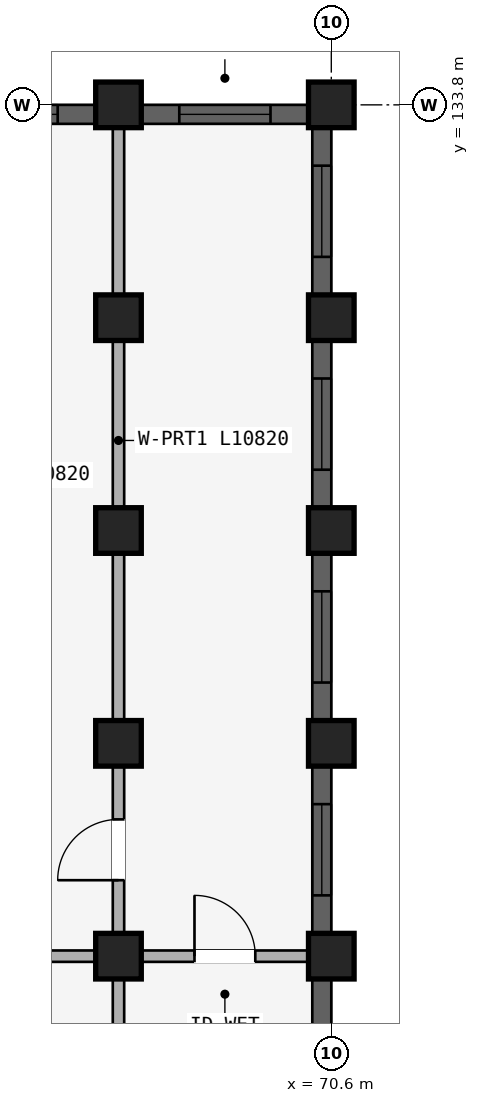
"""IFC4 building model, lengths in metres.
Left out: names, types, materials, properties, quantities, classifications, styles, units other than length and angle.
Written with IfcOpenShell. Run it as: python <this file> out.ifc"""

import sys

from ifc_helpers import new_model, si_unit, direction, frame, frame_2d, origin, origin_2d, place, context, subcontext, project, spatial, rectangle, extrude, element, fill, save


model = new_model("IFC4")
c1 = context("Model", 3, precision=1e-05, world=origin(), true_north=direction((0.0, 1.0)))
c2 = subcontext(c1, "Body", "Model", "MODEL_VIEW")
j1 = project(units=[si_unit("LENGTHUNIT", "METRE"), si_unit("PLANEANGLEUNIT", "RADIAN")], contexts=[c1])
p1 = place(None, origin())
s1 = spatial("IfcSite", under=j1, at=p1, CompositionType="ELEMENT")
p2 = place(p1, origin())
s2 = spatial("IfcBuilding", under=s1, at=p2, CompositionType="ELEMENT")
p3 = place(p2, frame((0.0, 0.0, 37.05)))
s3 = spatial("IfcBuildingStorey", under=s2, at=p3, CompositionType="ELEMENT", Elevation=37.05)
for number, where, z_axis, x_axis in (
    (1, (67.8, 122.6, 0.0), (0.0, 0.0, 1.0), (1.0, 0.0, 0.0)),
    (2, (67.8, 125.4, 0.0), (0.0, 0.0, 1.0), (1.0, 0.0, 0.0)),
    (3, (67.8, 128.2, 0.0), (0.0, 0.0, 1.0), (1.0, 0.0, 0.0)),
    (4, (67.8, 131.0, 0.0), (0.0, 0.0, 1.0), (1.0, 0.0, 0.0)),
):
    element("IfcColumn", number, at=place(p3, frame(where, z_axis=z_axis, x_axis=x_axis)), inside=s3, PredefinedType="COLUMN", context=c2, shape_type="SweptSolid", body=[
        extrude(rectangle(XDim=0.6, YDim=0.6, at=origin_2d()), origin(), (0.0, 0.0, 1.0), 2.93),
    ])
p4 = place(p3, frame((67.8, 133.8, 0.0), z_axis=(0.0, 0.0, 1.0), x_axis=(1.0, 0.0, 0.0)))
e5 = element("IfcColumn", 5, at=p4, inside=s3, PredefinedType="COLUMN", context=c2, shape_type="SweptSolid", body=[
    extrude(rectangle(XDim=0.6, YDim=0.6, at=origin_2d()), origin(), (0.0, 0.0, 1.0), 2.97),
])
for number, where, z_axis, x_axis in (
    (6, (70.6, 122.6, 0.0), (0.0, 0.0, 1.0), (1.0, 0.0, 0.0)),
    (7, (70.6, 125.4, 0.0), (0.0, 0.0, 1.0), (1.0, 0.0, 0.0)),
    (8, (70.6, 128.2, 0.0), (0.0, 0.0, 1.0), (1.0, 0.0, 0.0)),
    (9, (70.6, 131.0, 0.0), (0.0, 0.0, 1.0), (1.0, 0.0, 0.0)),
):
    element("IfcColumn", number, at=place(p3, frame(where, z_axis=z_axis, x_axis=x_axis)), inside=s3, PredefinedType="COLUMN", context=c2, shape_type="SweptSolid", body=[
        extrude(rectangle(XDim=0.6, YDim=0.6, at=origin_2d()), origin(), (0.0, 0.0, 1.0), 2.93),
    ])
p5 = place(p3, frame((70.6, 133.8, 0.0), z_axis=(0.0, 0.0, 1.0), x_axis=(1.0, 0.0, 0.0)))
e10 = element("IfcColumn", 10, at=p5, inside=s3, PredefinedType="COLUMN", context=c2, shape_type="SweptSolid", body=[
    extrude(rectangle(XDim=0.6, YDim=0.6, at=origin_2d()), origin(), (0.0, 0.0, 1.0), 2.97),
])
p6 = place(p3, frame((65.08, 122.6, 0.0), z_axis=(0.0, 0.0, 1.0), x_axis=(1.0, 0.0, 0.0)))
e11 = element("IfcWall", 11, at=p6, inside=s3, PredefinedType="PLUMBINGWALL", context=c2, shape_type="SweptSolid", body=[
    extrude(rectangle(XDim=2.64, YDim=0.15, at=frame_2d((1.32, 0.0))), origin(), (0.0, 0.0, 1.0), 2.372),
])
p7 = place(p6, frame((0.87, 0.0, 0.0)))
e12 = element("IfcOpeningElement", 12, at=p7, cuts=e11, PredefinedType="OPENING", context=c2, shape_type="SweptSolid", body=[
    extrude(rectangle(XDim=0.9, YDim=2.1, at=frame_2d((0.45, 1.05))), frame((0.0, 0.085, 0.0), z_axis=(0.0, -1.0, 0.0), x_axis=(1.0, 0.0, 0.0)), (0.0, 0.0, 1.0), 0.17),
])
p8 = place(p3, frame((67.88, 122.6, 0.0), z_axis=(0.0, 0.0, 1.0), x_axis=(1.0, 0.0, 0.0)))
e13 = element("IfcWall", 13, at=p8, inside=s3, PredefinedType="PLUMBINGWALL", context=c2, shape_type="SweptSolid", body=[
    extrude(rectangle(XDim=2.64, YDim=0.15, at=frame_2d((1.32, 0.0))), origin(), (0.0, 0.0, 1.0), 2.372),
])
p9 = place(p8, frame((0.92, 0.0, 0.0)))
e14 = element("IfcOpeningElement", 14, at=p9, cuts=e13, PredefinedType="OPENING", context=c2, shape_type="SweptSolid", body=[
    extrude(rectangle(XDim=0.8, YDim=2.1, at=frame_2d((0.4, 1.05))), frame((0.0, 0.085, 0.0), z_axis=(0.0, -1.0, 0.0), x_axis=(1.0, 0.0, 0.0)), (0.0, 0.0, 1.0), 0.17),
])
p10 = place(p3, frame((67.8, 116.05, 0.0), z_axis=(0.0, 0.0, 1.0), x_axis=(0.0, 1.0, 0.0)))
e15 = element("IfcWall", 15, at=p10, inside=s3, PredefinedType="PARTITIONING", context=c2, shape_type="SweptSolid", body=[
    extrude(rectangle(XDim=6.53, YDim=0.15, at=frame_2d((3.265, 0.0))), origin(), (0.0, 0.0, 1.0), 2.372),
])
p11 = place(p10, frame((2.815, 0.0, 0.0)))
e16 = element("IfcOpeningElement", 16, at=p11, cuts=e15, PredefinedType="OPENING", context=c2, shape_type="SweptSolid", body=[
    extrude(rectangle(XDim=0.9, YDim=2.1, at=frame_2d((0.45, 1.05))), frame((0.0, 0.085, 0.0), z_axis=(0.0, -1.0, 0.0), x_axis=(1.0, 0.0, 0.0)), (0.0, 0.0, 1.0), 0.17),
])
p12 = place(p3, frame((67.8, 122.7, 0.0), z_axis=(0.0, 0.0, 1.0), x_axis=(0.0, 1.0, 0.0)))
e17 = element("IfcWall", 17, at=p12, inside=s3, PredefinedType="PARTITIONING", context=c2, shape_type="SweptSolid", body=[
    extrude(rectangle(XDim=10.82, YDim=0.15, at=frame_2d((5.41, 0.0))), origin(), (0.0, 0.0, 1.0), 2.372),
])
p13 = place(p12, frame((0.899, 0.0, 0.0)))
e18 = element("IfcOpeningElement", 18, at=p13, cuts=e17, PredefinedType="OPENING", context=c2, shape_type="SweptSolid", body=[
    extrude(rectangle(XDim=0.8, YDim=2.1, at=frame_2d((0.4, 1.05))), frame((0.0, 0.085, 0.0), z_axis=(0.0, -1.0, 0.0), x_axis=(1.0, 0.0, 0.0)), (0.0, 0.0, 1.0), 0.17),
])
p14 = place(p3, frame((65.303, 133.675, 0.0), z_axis=(0.0, 0.0, 1.0), x_axis=(1.0, 0.0, 0.0)))
e19 = element("IfcWall", 19, at=p14, inside=s3, PredefinedType="STANDARD", context=c2, shape_type="SweptSolid", body=[
    extrude(rectangle(XDim=2.193, YDim=0.25, at=frame_2d((1.097, 0.0))), origin(), (0.0, 0.0, 1.0), 2.48),
])
p15 = place(p14, frame((0.497, 0.0, 0.78)))
e20 = element("IfcOpeningElement", 20, at=p15, cuts=e19, PredefinedType="OPENING", context=c2, shape_type="SweptSolid", body=[
    extrude(rectangle(XDim=1.2, YDim=1.5, at=frame_2d((0.6, 0.75))), frame((0.0, 0.135, 0.0), z_axis=(0.0, -1.0, 0.0), x_axis=(1.0, 0.0, 0.0)), (0.0, 0.0, 1.0), 0.27),
])
p16 = place(p3, frame((68.104, 133.675, 0.0), z_axis=(0.0, 0.0, 1.0), x_axis=(1.0, 0.0, 0.0)))
e21 = element("IfcWall", 21, at=p16, inside=s3, PredefinedType="STANDARD", context=c2, shape_type="SweptSolid", body=[
    extrude(rectangle(XDim=2.193, YDim=0.25, at=frame_2d((1.096, 0.0))), origin(), (0.0, 0.0, 1.0), 2.48),
])
p17 = place(p16, frame((0.497, 0.0, 0.78)))
e22 = element("IfcOpeningElement", 22, at=p17, cuts=e21, PredefinedType="OPENING", context=c2, shape_type="SweptSolid", body=[
    extrude(rectangle(XDim=1.2, YDim=1.5, at=frame_2d((0.6, 0.75))), frame((0.0, 0.135, 0.0), z_axis=(0.0, -1.0, 0.0), x_axis=(1.0, 0.0, 0.0)), (0.0, 0.0, 1.0), 0.27),
])
p18 = place(p3, frame((70.475, 116.329, 0.0), z_axis=(0.0, 0.0, 1.0), x_axis=(0.0, 1.0, 0.0)))
e23 = element("IfcWall", 23, at=p18, inside=s3, PredefinedType="STANDARD", context=c2, shape_type="SweptSolid", body=[
    extrude(rectangle(XDim=5.968, YDim=0.25, at=frame_2d((2.984, 0.0))), origin(), (0.0, 0.0, 1.0), 2.372),
])
p19 = place(p18, frame((2.221, 0.0, 0.522)))
e24 = element("IfcOpeningElement", 24, at=p19, cuts=e23, PredefinedType="OPENING", context=c2, shape_type="SweptSolid", body=[
    extrude(rectangle(XDim=1.5, YDim=1.65, at=frame_2d((0.75, 0.825))), frame((0.0, 0.135, 0.0), z_axis=(0.0, -1.0, 0.0), x_axis=(1.0, 0.0, 0.0)), (0.0, 0.0, 1.0), 0.27),
])
p20 = place(p3, frame((70.475, 122.904, 0.0), z_axis=(0.0, 0.0, 1.0), x_axis=(0.0, 1.0, 0.0)))
e25 = element("IfcWall", 25, at=p20, inside=s3, PredefinedType="STANDARD", context=c2, shape_type="SweptSolid", body=[
    extrude(rectangle(XDim=2.193, YDim=0.25, at=frame_2d((1.096, 0.0))), origin(), (0.0, 0.0, 1.0), 2.372),
])
p21 = place(p20, frame((0.497, 0.0, 0.672)))
e26 = element("IfcOpeningElement", 26, at=p21, cuts=e25, PredefinedType="OPENING", context=c2, shape_type="SweptSolid", body=[
    extrude(rectangle(XDim=1.2, YDim=1.5, at=frame_2d((0.6, 0.75))), frame((0.0, 0.135, 0.0), z_axis=(0.0, -1.0, 0.0), x_axis=(1.0, 0.0, 0.0)), (0.0, 0.0, 1.0), 0.27),
])
p22 = place(p3, frame((70.475, 125.704, 0.0), z_axis=(0.0, 0.0, 1.0), x_axis=(0.0, 1.0, 0.0)))
e27 = element("IfcWall", 27, at=p22, inside=s3, PredefinedType="STANDARD", context=c2, shape_type="SweptSolid", body=[
    extrude(rectangle(XDim=2.193, YDim=0.25, at=frame_2d((1.096, 0.0))), origin(), (0.0, 0.0, 1.0), 2.372),
])
p23 = place(p22, frame((0.497, 0.0, 0.672)))
e28 = element("IfcOpeningElement", 28, at=p23, cuts=e27, PredefinedType="OPENING", context=c2, shape_type="SweptSolid", body=[
    extrude(rectangle(XDim=1.2, YDim=1.5, at=frame_2d((0.6, 0.75))), frame((0.0, 0.135, 0.0), z_axis=(0.0, -1.0, 0.0), x_axis=(1.0, 0.0, 0.0)), (0.0, 0.0, 1.0), 0.27),
])
p24 = place(p3, frame((70.475, 128.503, 0.0), z_axis=(0.0, 0.0, 1.0), x_axis=(0.0, 1.0, 0.0)))
e29 = element("IfcWall", 29, at=p24, inside=s3, PredefinedType="STANDARD", context=c2, shape_type="SweptSolid", body=[
    extrude(rectangle(XDim=2.193, YDim=0.25, at=frame_2d((1.097, 0.0))), origin(), (0.0, 0.0, 1.0), 2.372),
])
p25 = place(p24, frame((0.497, 0.0, 0.672)))
e30 = element("IfcOpeningElement", 30, at=p25, cuts=e29, PredefinedType="OPENING", context=c2, shape_type="SweptSolid", body=[
    extrude(rectangle(XDim=1.2, YDim=1.5, at=frame_2d((0.6, 0.75))), frame((0.0, 0.135, 0.0), z_axis=(0.0, -1.0, 0.0), x_axis=(1.0, 0.0, 0.0)), (0.0, 0.0, 1.0), 0.27),
])
p26 = place(p3, frame((70.475, 131.303, 0.0), z_axis=(0.0, 0.0, 1.0), x_axis=(0.0, 1.0, 0.0)))
e31 = element("IfcWall", 31, at=p26, inside=s3, PredefinedType="STANDARD", context=c2, shape_type="SweptSolid", body=[
    extrude(rectangle(XDim=2.193, YDim=0.25, at=frame_2d((1.097, 0.0))), origin(), (0.0, 0.0, 1.0), 2.412),
])
p27 = place(p26, frame((0.497, 0.0, 0.712)))
e32 = element("IfcOpeningElement", 32, at=p27, cuts=e31, PredefinedType="OPENING", context=c2, shape_type="SweptSolid", body=[
    extrude(rectangle(XDim=1.2, YDim=1.5, at=frame_2d((0.6, 0.75))), frame((0.0, 0.135, 0.0), z_axis=(0.0, -1.0, 0.0), x_axis=(1.0, 0.0, 0.0)), (0.0, 0.0, 1.0), 0.27),
])
p28 = place(p15, origin())
e33 = element("IfcWindow", 33, at=p28, inside=s3, PartitioningType="SINGLE_PANEL", PredefinedType="WINDOW", context=c2, shape_type="SweptSolid", body=[
    extrude(rectangle(XDim=1.2, YDim=1.5, at=frame_2d((0.6, 0.75))), frame((0.0, 0.03, 0.0), z_axis=(0.0, -1.0, 0.0), x_axis=(1.0, 0.0, 0.0)), (0.0, 0.0, 1.0), 0.06),
])
fill(e20, e33)
p29 = place(p17, origin())
e34 = element("IfcWindow", 34, at=p29, inside=s3, PartitioningType="SINGLE_PANEL", PredefinedType="WINDOW", context=c2, shape_type="SweptSolid", body=[
    extrude(rectangle(XDim=1.2, YDim=1.5, at=frame_2d((0.6, 0.75))), frame((0.0, 0.03, 0.0), z_axis=(0.0, -1.0, 0.0), x_axis=(1.0, 0.0, 0.0)), (0.0, 0.0, 1.0), 0.06),
])
fill(e22, e34)
p30 = place(p21, origin())
e35 = element("IfcWindow", 35, at=p30, inside=s3, PartitioningType="SINGLE_PANEL", PredefinedType="WINDOW", context=c2, shape_type="SweptSolid", body=[
    extrude(rectangle(XDim=1.2, YDim=1.5, at=frame_2d((0.6, 0.75))), frame((0.0, 0.03, 0.0), z_axis=(0.0, -1.0, 0.0), x_axis=(1.0, 0.0, 0.0)), (0.0, 0.0, 1.0), 0.06),
])
fill(e26, e35)
p31 = place(p23, origin())
e36 = element("IfcWindow", 36, at=p31, inside=s3, PartitioningType="SINGLE_PANEL", PredefinedType="WINDOW", context=c2, shape_type="SweptSolid", body=[
    extrude(rectangle(XDim=1.2, YDim=1.5, at=frame_2d((0.6, 0.75))), frame((0.0, 0.03, 0.0), z_axis=(0.0, -1.0, 0.0), x_axis=(1.0, 0.0, 0.0)), (0.0, 0.0, 1.0), 0.06),
])
fill(e28, e36)
p32 = place(p25, origin())
e37 = element("IfcWindow", 37, at=p32, inside=s3, PartitioningType="SINGLE_PANEL", PredefinedType="WINDOW", context=c2, shape_type="SweptSolid", body=[
    extrude(rectangle(XDim=1.2, YDim=1.5, at=frame_2d((0.6, 0.75))), frame((0.0, 0.03, 0.0), z_axis=(0.0, -1.0, 0.0), x_axis=(1.0, 0.0, 0.0)), (0.0, 0.0, 1.0), 0.06),
])
fill(e30, e37)
p33 = place(p27, origin())
e38 = element("IfcWindow", 38, at=p33, inside=s3, PartitioningType="SINGLE_PANEL", PredefinedType="WINDOW", context=c2, shape_type="SweptSolid", body=[
    extrude(rectangle(XDim=1.2, YDim=1.5, at=frame_2d((0.6, 0.75))), frame((0.0, 0.03, 0.0), z_axis=(0.0, -1.0, 0.0), x_axis=(1.0, 0.0, 0.0)), (0.0, 0.0, 1.0), 0.06),
])
fill(e32, e38)
p34 = place(p9, origin())
e39 = element("IfcDoor", 39, at=p34, inside=s3, OperationType="SINGLE_SWING_LEFT", PredefinedType="DOOR", context=c2, shape_type="SweptSolid", body=[
    extrude(rectangle(XDim=0.8, YDim=2.1, at=frame_2d((0.4, 1.05))), frame((0.0, 0.025, 0.0), z_axis=(0.0, -1.0, 0.0), x_axis=(1.0, 0.0, 0.0)), (0.0, 0.0, 1.0), 0.05),
])
fill(e14, e39)
p35 = place(p13, frame((0.8, 0.0, 0.0), z_axis=(0.0, 0.0, 1.0), x_axis=(-1.0, 0.0, 0.0)))
e40 = element("IfcDoor", 40, at=p35, inside=s3, OperationType="SINGLE_SWING_RIGHT", PredefinedType="DOOR", context=c2, shape_type="SweptSolid", body=[
    extrude(rectangle(XDim=0.8, YDim=2.1, at=frame_2d((0.4, 1.05))), frame((0.0, 0.025, 0.0), z_axis=(0.0, -1.0, 0.0), x_axis=(1.0, 0.0, 0.0)), (0.0, 0.0, 1.0), 0.05),
])
fill(e18, e40)
save(model, sys.argv[1])
